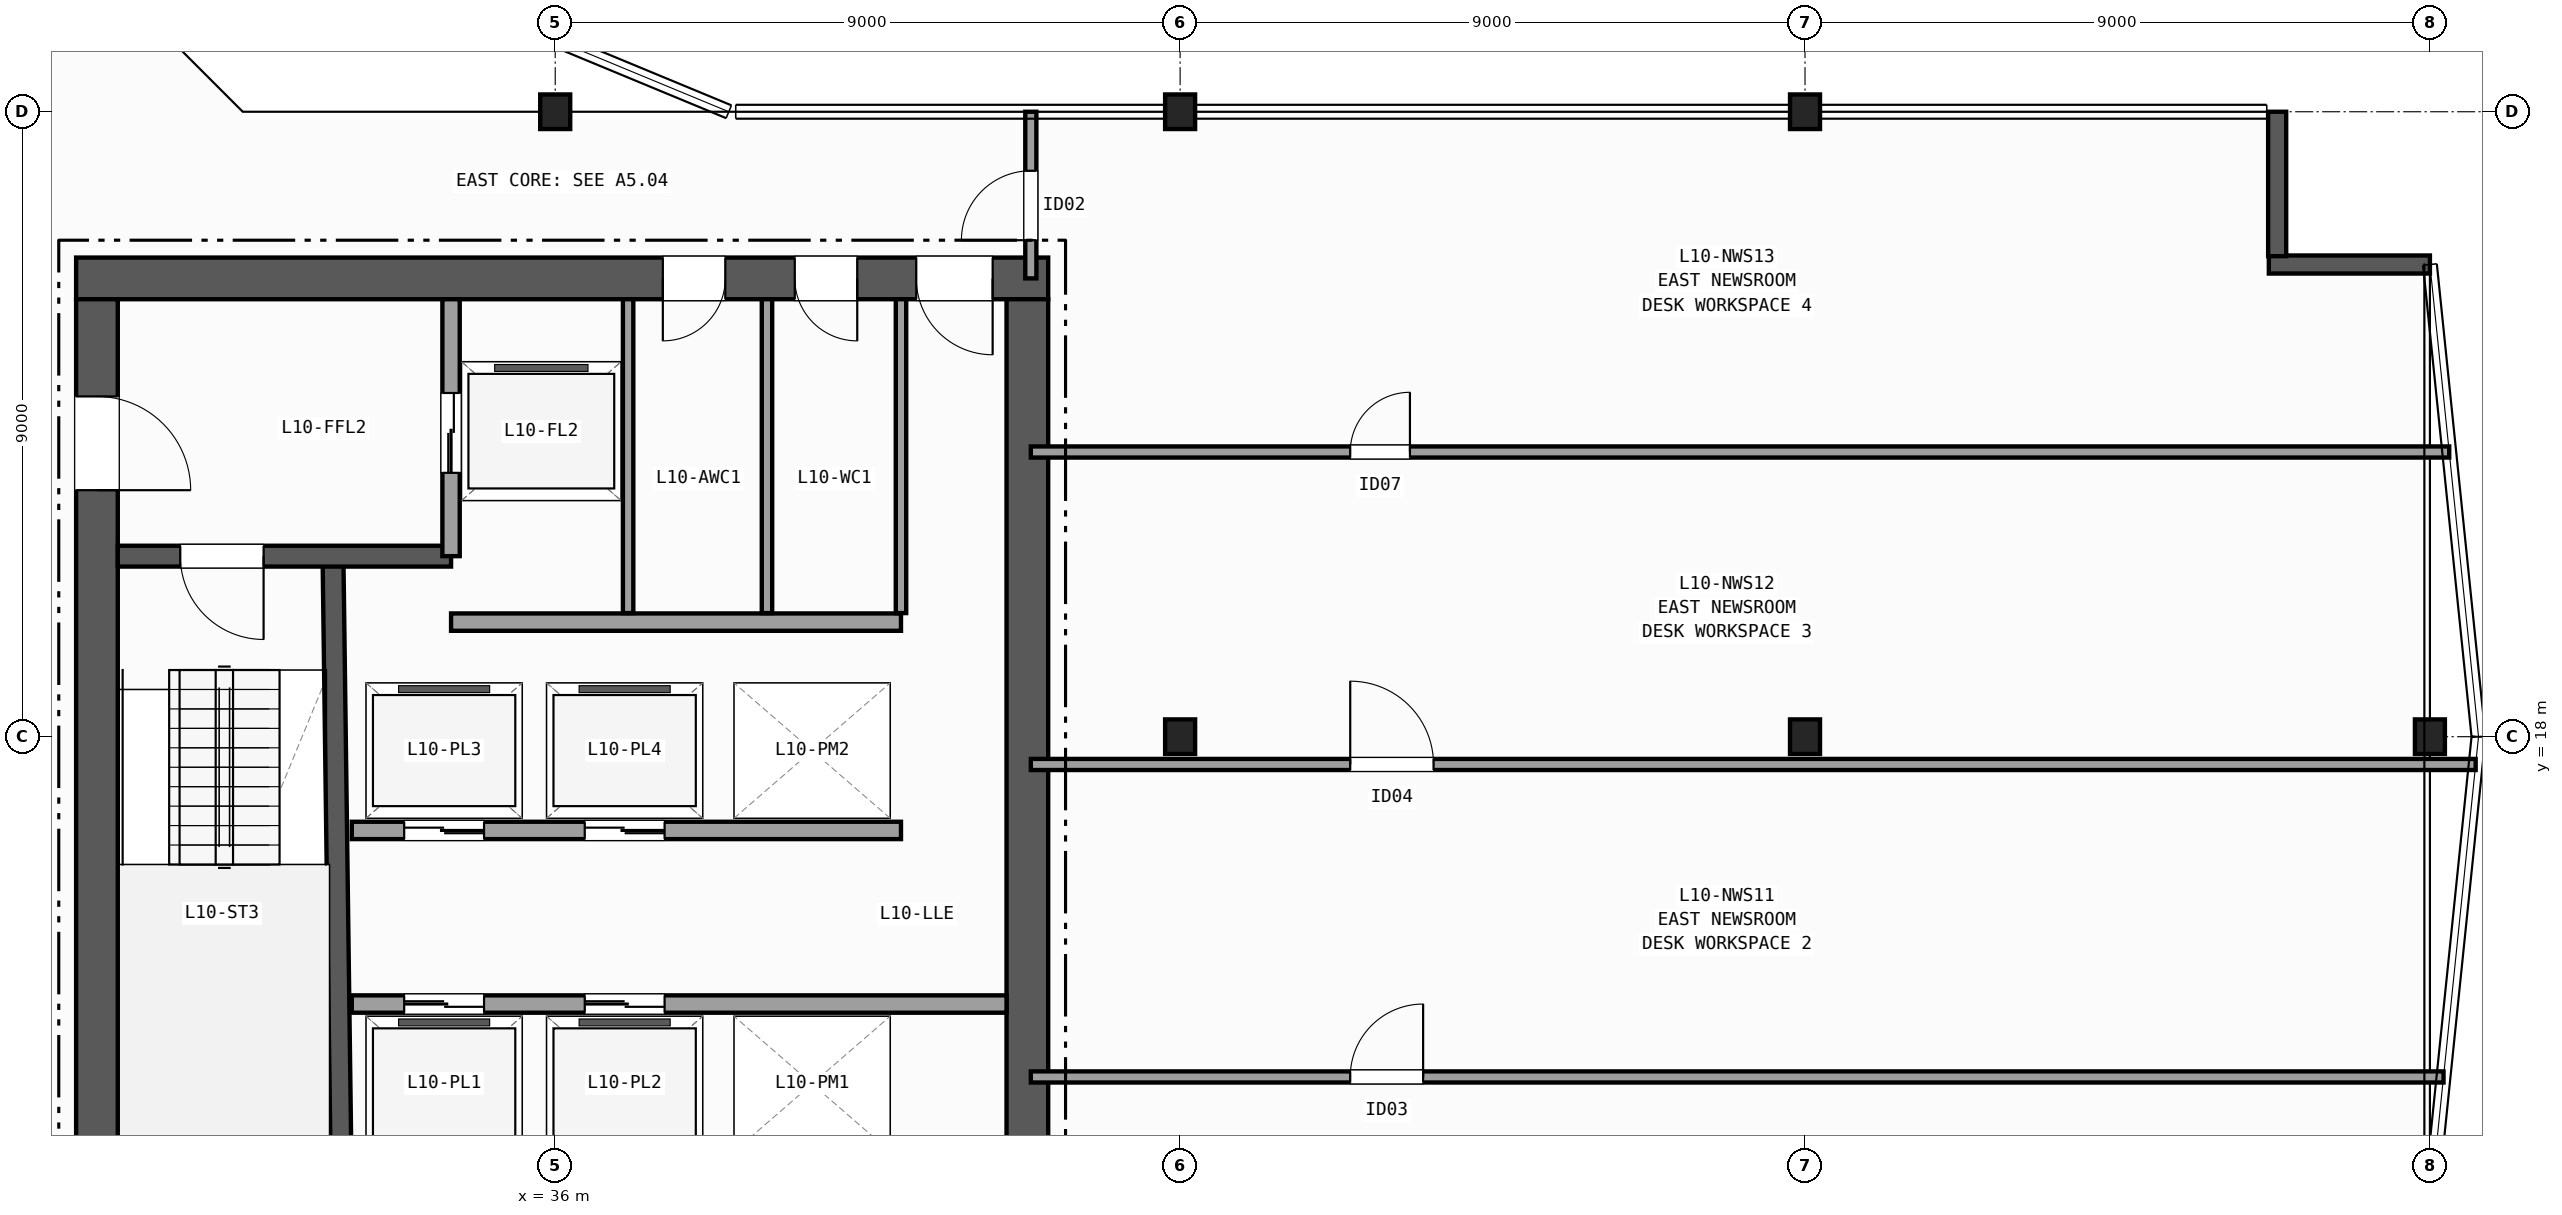
"""IFC4 building model, lengths in metres.
Left out: names, types, materials, properties, quantities, classifications, styles, units other than length and angle.
Written with IfcOpenShell. Run it as: python <this file> out.ifc"""

import sys

from ifc_helpers import new_model, si_unit, direction, frame, frame_2d, origin, origin_2d, place, context, subcontext, project, spatial, rectangle, i_section, extrude, element, fill, save


model = new_model("IFC4")
c1 = context("Model", 3, precision=1e-05, world=origin(), true_north=direction((0.0, 1.0)))
c2 = subcontext(c1, "Body", "Model", "MODEL_VIEW")
j1 = project(units=[si_unit("LENGTHUNIT", "METRE"), si_unit("PLANEANGLEUNIT", "RADIAN")], contexts=[c1])
p1 = place(None, origin())
s1 = spatial("IfcSite", under=j1, at=p1, CompositionType="ELEMENT")
p2 = place(p1, origin())
s2 = spatial("IfcBuilding", under=s1, at=p2, CompositionType="ELEMENT")
p3 = place(p2, frame((0.0, 0.0, 47.1)))
s3 = spatial("IfcBuildingStorey", under=s2, at=p3, CompositionType="ELEMENT", Elevation=47.1)
for number, where, z_axis, x_axis in (
    (1, (36.0, 27.0, 0.0), (0.0, 0.0, 1.0), (1.0, 0.0, 0.0)),
    (2, (45.0, 18.0, 0.0), (0.0, 0.0, 1.0), (1.0, 0.0, 0.0)),
    (3, (45.0, 27.0, 0.0), (0.0, 0.0, 1.0), (1.0, 0.0, 0.0)),
    (4, (54.0, 18.0, 0.0), (0.0, 0.0, 1.0), (1.0, 0.0, 0.0)),
    (5, (54.0, 27.0, 0.0), (0.0, 0.0, 1.0), (1.0, 0.0, 0.0)),
    (6, (63.0, 18.0, 0.0), (0.0, 0.0, 1.0), (1.0, 0.0, 0.0)),
):
    element("IfcColumn", number, at=place(p3, frame(where, z_axis=z_axis, x_axis=x_axis)), inside=s3, PredefinedType="COLUMN", context=c2, shape_type="SweptSolid", body=[
        extrude(i_section(OverallWidth=0.432, OverallDepth=0.498, WebThickness=0.056, FlangeThickness=0.089, FilletRadius=0.015, at=origin_2d()), origin(), (0.0, 0.0, 1.0), 3.7),
    ])
p4 = place(p3, frame((63.0, 24.8, 0.0), z_axis=(0.0, 0.0, 1.0), x_axis=(-1.0, 0.0, 0.0)))
e7 = element("IfcWall", 7, at=p4, inside=s3, PredefinedType="SOLIDWALL", context=c2, shape_type="SweptSolid", body=[
    extrude(rectangle(XDim=2.32, YDim=0.26, at=frame_2d((1.16, 0.0))), origin(), (0.0, 0.0, 1.0), 3.42),
])
p5 = place(p3, frame((60.8, 24.92, 0.0), z_axis=(0.0, 0.0, 1.0), x_axis=(0.0, 1.0, 0.0)))
e8 = element("IfcWall", 8, at=p5, inside=s3, PredefinedType="SOLIDWALL", context=c2, shape_type="SweptSolid", body=[
    extrude(rectangle(XDim=2.08, YDim=0.26, at=frame_2d((1.04, 0.0))), origin(), (0.0, 0.0, 1.0), 3.42),
])
p6 = place(p3, frame((43.1, 24.6, 0.0), z_axis=(0.0, 0.0, 1.0), x_axis=(-1.0, 0.0, 0.0)))
e9 = element("IfcWall", 9, at=p6, inside=s3, PredefinedType="SHEAR", context=c2, shape_type="SweptSolid", body=[
    extrude(rectangle(XDim=14.0, YDim=0.6, at=frame_2d((7.0, 0.0))), origin(), (0.0, 0.0, 1.0), 3.42),
])
p7 = place(p6, frame((0.8, 0.0, 0.0)))
e10 = element("IfcOpeningElement", 10, at=p7, cuts=e9, PredefinedType="OPENING", context=c2, shape_type="SweptSolid", body=[
    extrude(rectangle(XDim=1.1, YDim=2.15, at=frame_2d((0.55, 1.075))), frame((0.0, 0.31, 0.0), z_axis=(0.0, -1.0, 0.0), x_axis=(1.0, 0.0, 0.0)), (0.0, 0.0, 1.0), 0.62),
])
p8 = place(p6, frame((2.75, 0.0, 0.0)))
e11 = element("IfcOpeningElement", 11, at=p8, cuts=e9, PredefinedType="OPENING", context=c2, shape_type="SweptSolid", body=[
    extrude(rectangle(XDim=0.9, YDim=2.1, at=frame_2d((0.45, 1.05))), frame((0.0, 0.31, 0.0), z_axis=(0.0, -1.0, 0.0), x_axis=(1.0, 0.0, 0.0)), (0.0, 0.0, 1.0), 0.62),
])
p9 = place(p6, frame((4.65, 0.0, 0.0)))
e12 = element("IfcOpeningElement", 12, at=p9, cuts=e9, PredefinedType="OPENING", context=c2, shape_type="SweptSolid", body=[
    extrude(rectangle(XDim=0.9, YDim=2.1, at=frame_2d((0.45, 1.05))), frame((0.0, 0.31, 0.0), z_axis=(0.0, -1.0, 0.0), x_axis=(1.0, 0.0, 0.0)), (0.0, 0.0, 1.0), 0.62),
])
p10 = place(p3, frame((29.4, 24.3, 0.0), z_axis=(0.0, 0.0, 1.0), x_axis=(0.0, -1.0, 0.0)))
e13 = element("IfcWall", 13, at=p10, inside=s3, PredefinedType="SHEAR", context=c2, shape_type="SweptSolid", body=[
    extrude(rectangle(XDim=12.8, YDim=0.6, at=frame_2d((6.4, 0.0))), origin(), (0.0, 0.0, 1.0), 3.42),
])
p11 = place(p10, frame((1.4, 0.0, 0.0)))
e14 = element("IfcOpeningElement", 14, at=p11, cuts=e13, PredefinedType="OPENING", context=c2, shape_type="SweptSolid", body=[
    extrude(rectangle(XDim=1.35, YDim=2.15, at=frame_2d((0.675, 1.075))), frame((0.0, 0.31, 0.0), z_axis=(0.0, -1.0, 0.0), x_axis=(1.0, 0.0, 0.0)), (0.0, 0.0, 1.0), 0.62),
])
p12 = place(p3, frame((42.8, 11.5, 0.0), z_axis=(0.0, 0.0, 1.0), x_axis=(0.0, 1.0, 0.0)))
e15 = element("IfcWall", 15, at=p12, inside=s3, PredefinedType="SHEAR", context=c2, shape_type="SweptSolid", body=[
    extrude(rectangle(XDim=12.8, YDim=0.6, at=frame_2d((6.4, 0.0))), origin(), (0.0, 0.0, 1.0), 3.42),
])
p13 = place(p3, frame((32.92, 11.5, 0.0), z_axis=(0.0, 0.0, 1.0), x_axis=(-0.013244407292, 0.999912288991, 0.0)))
e16 = element("IfcWall", 16, at=p13, inside=s3, PredefinedType="SHEAR", context=c2, shape_type="SweptSolid", body=[
    extrude(rectangle(XDim=9.051, YDim=0.3, at=frame_2d((4.525, 0.0))), origin(), (0.0, 0.0, 1.0), 3.42),
])
p14 = place(p3, frame((34.5, 20.6, 0.0), z_axis=(0.0, 0.0, 1.0), x_axis=(-1.0, 0.0, 0.0)))
e17 = element("IfcWall", 17, at=p14, inside=s3, PredefinedType="SHEAR", context=c2, shape_type="SweptSolid", body=[
    extrude(rectangle(XDim=4.8, YDim=0.3, at=frame_2d((2.4, 0.0))), origin(), (0.0, 0.0, 1.0), 3.42),
])
p15 = place(p14, frame((2.7, 0.0, 0.0)))
e18 = element("IfcOpeningElement", 18, at=p15, cuts=e17, PredefinedType="OPENING", context=c2, shape_type="SweptSolid", body=[
    extrude(rectangle(XDim=1.2, YDim=2.15, at=frame_2d((0.6, 1.075))), frame((0.0, 0.16, 0.0), z_axis=(0.0, -1.0, 0.0), x_axis=(1.0, 0.0, 0.0)), (0.0, 0.0, 1.0), 0.32),
])
p16 = place(p3, frame((34.5, 20.6, 0.0), z_axis=(0.0, 0.0, 1.0), x_axis=(0.0, 1.0, 0.0)))
e19 = element("IfcWall", 19, at=p16, inside=s3, PredefinedType="PARTITIONING", context=c2, shape_type="SweptSolid", body=[
    extrude(rectangle(XDim=3.7, YDim=0.25, at=frame_2d((1.85, 0.0))), origin(), (0.0, 0.0, 1.0), 3.42),
])
p17 = place(p16, frame((1.2, 0.0, 0.0)))
e20 = element("IfcOpeningElement", 20, at=p17, cuts=e19, PredefinedType="OPENING", context=c2, shape_type="SweptSolid", body=[
    extrude(rectangle(XDim=1.15, YDim=2.15, at=frame_2d((0.575, 1.075))), frame((0.0, 0.135, 0.0), z_axis=(0.0, -1.0, 0.0), x_axis=(1.0, 0.0, 0.0)), (0.0, 0.0, 1.0), 0.27),
])
p18 = place(p3, frame((34.5, 19.65, 0.0), z_axis=(0.0, 0.0, 1.0), x_axis=(1.0, 0.0, 0.0)))
e21 = element("IfcWall", 21, at=p18, inside=s3, PredefinedType="PARTITIONING", context=c2, shape_type="SweptSolid", body=[
    extrude(rectangle(XDim=6.48, YDim=0.25, at=frame_2d((3.24, 0.0))), origin(), (0.0, 0.0, 1.0), 3.42),
])
p19 = place(p3, frame((33.07, 14.15, 0.0), z_axis=(0.0, 0.0, 1.0), x_axis=(1.0, 0.0, 0.0)))
e22 = element("IfcWall", 22, at=p19, inside=s3, PredefinedType="PARTITIONING", context=c2, shape_type="SweptSolid", body=[
    extrude(rectangle(XDim=9.43, YDim=0.25, at=frame_2d((4.715, 0.0))), origin(), (0.0, 0.0, 1.0), 3.42),
])
p20 = place(p19, frame((0.755, 0.0, 0.0)))
e23 = element("IfcOpeningElement", 23, at=p20, cuts=e22, PredefinedType="OPENING", context=c2, shape_type="SweptSolid", body=[
    extrude(rectangle(XDim=1.15, YDim=2.15, at=frame_2d((0.575, 1.075))), frame((0.0, 0.135, 0.0), z_axis=(0.0, -1.0, 0.0), x_axis=(1.0, 0.0, 0.0)), (0.0, 0.0, 1.0), 0.27),
])
p21 = place(p19, frame((3.355, 0.0, 0.0)))
e24 = element("IfcOpeningElement", 24, at=p21, cuts=e22, PredefinedType="OPENING", context=c2, shape_type="SweptSolid", body=[
    extrude(rectangle(XDim=1.15, YDim=2.15, at=frame_2d((0.575, 1.075))), frame((0.0, 0.135, 0.0), z_axis=(0.0, -1.0, 0.0), x_axis=(1.0, 0.0, 0.0)), (0.0, 0.0, 1.0), 0.27),
])
p22 = place(p3, frame((40.98, 16.65, 0.0), z_axis=(0.0, 0.0, 1.0), x_axis=(-1.0, 0.0, 0.0)))
e25 = element("IfcWall", 25, at=p22, inside=s3, PredefinedType="PARTITIONING", context=c2, shape_type="SweptSolid", body=[
    extrude(rectangle(XDim=7.91, YDim=0.25, at=frame_2d((3.955, 0.0))), origin(), (0.0, 0.0, 1.0), 3.42),
])
p23 = place(p22, frame((6.005, 0.0, 0.0)))
e26 = element("IfcOpeningElement", 26, at=p23, cuts=e25, PredefinedType="OPENING", context=c2, shape_type="SweptSolid", body=[
    extrude(rectangle(XDim=1.15, YDim=2.15, at=frame_2d((0.575, 1.075))), frame((0.0, 0.135, 0.0), z_axis=(0.0, -1.0, 0.0), x_axis=(1.0, 0.0, 0.0)), (0.0, 0.0, 1.0), 0.27),
])
p24 = place(p22, frame((3.405, 0.0, 0.0)))
e27 = element("IfcOpeningElement", 27, at=p24, cuts=e25, PredefinedType="OPENING", context=c2, shape_type="SweptSolid", body=[
    extrude(rectangle(XDim=1.15, YDim=2.15, at=frame_2d((0.575, 1.075))), frame((0.0, 0.135, 0.0), z_axis=(0.0, -1.0, 0.0), x_axis=(1.0, 0.0, 0.0)), (0.0, 0.0, 1.0), 0.27),
])
for number, where, z_axis, x_axis in (
    (28, (37.05, 19.78, 0.0), (0.0, 0.0, 1.0), (0.0, 1.0, 0.0)),
    (29, (39.05, 19.78, 0.0), (0.0, 0.0, 1.0), (0.0, 1.0, 0.0)),
    (30, (40.98, 19.78, 0.0), (0.0, 0.0, 1.0), (0.0, 1.0, 0.0)),
):
    element("IfcWall", number, at=place(p3, frame(where, z_axis=z_axis, x_axis=x_axis)), inside=s3, PredefinedType="PARTITIONING", context=c2, shape_type="SweptSolid", body=[
        extrude(rectangle(XDim=4.52, YDim=0.15, at=frame_2d((2.26, 0.0))), origin(), (0.0, 0.0, 1.0), 3.42),
    ])
p25 = place(p3, frame((42.85, 24.6, 0.0), z_axis=(0.0, 0.0, 1.0), x_axis=(0.0, 1.0, 0.0)))
e31 = element("IfcWall", 31, at=p25, inside=s3, PredefinedType="PARTITIONING", context=c2, shape_type="SweptSolid", body=[
    extrude(rectangle(XDim=2.4, YDim=0.16, at=frame_2d((1.2, 0.0))), origin(), (0.0, 0.0, 1.0), 2.627),
])
p26 = place(p25, frame((0.55, 0.0, 0.0)))
e32 = element("IfcOpeningElement", 32, at=p26, cuts=e31, PredefinedType="OPENING", context=c2, shape_type="SweptSolid", body=[
    extrude(rectangle(XDim=1.0, YDim=2.1, at=frame_2d((0.5, 1.05))), frame((0.0, 0.09, 0.0), z_axis=(0.0, -1.0, 0.0), x_axis=(1.0, 0.0, 0.0)), (0.0, 0.0, 1.0), 0.18),
])
p27 = place(p3, frame((42.85, 13.1, 0.0), z_axis=(0.0, 0.0, 1.0), x_axis=(1.0, 0.0, 0.0)))
e33 = element("IfcWall", 33, at=p27, inside=s3, PredefinedType="PARTITIONING", context=c2, shape_type="SweptSolid", body=[
    extrude(rectangle(XDim=20.346, YDim=0.16, at=frame_2d((10.173, 0.0))), origin(), (0.0, 0.0, 1.0), 3.42),
])
p28 = place(p27, frame((4.6, 0.0, 0.0)))
e34 = element("IfcOpeningElement", 34, at=p28, cuts=e33, PredefinedType="OPENING", context=c2, shape_type="SweptSolid", body=[
    extrude(rectangle(XDim=1.05, YDim=2.15, at=frame_2d((0.525, 1.075))), frame((0.0, 0.09, 0.0), z_axis=(0.0, -1.0, 0.0), x_axis=(1.0, 0.0, 0.0)), (0.0, 0.0, 1.0), 0.18),
])
p29 = place(p3, frame((42.85, 17.6, 0.0), z_axis=(0.0, 0.0, 1.0), x_axis=(1.0, 0.0, 0.0)))
e35 = element("IfcWall", 35, at=p29, inside=s3, PredefinedType="PARTITIONING", context=c2, shape_type="SweptSolid", body=[
    extrude(rectangle(XDim=20.809, YDim=0.16, at=frame_2d((10.404, 0.0))), origin(), (0.0, 0.0, 1.0), 3.42),
])
p30 = place(p29, frame((4.6, 0.0, 0.0)))
e36 = element("IfcOpeningElement", 36, at=p30, cuts=e35, PredefinedType="OPENING", context=c2, shape_type="SweptSolid", body=[
    extrude(rectangle(XDim=1.2, YDim=2.15, at=frame_2d((0.6, 1.075))), frame((0.0, 0.09, 0.0), z_axis=(0.0, -1.0, 0.0), x_axis=(1.0, 0.0, 0.0)), (0.0, 0.0, 1.0), 0.18),
])
p31 = place(p3, frame((42.85, 22.1, 0.0), z_axis=(0.0, 0.0, 1.0), x_axis=(1.0, 0.0, 0.0)))
e37 = element("IfcWall", 37, at=p31, inside=s3, PredefinedType="PARTITIONING", context=c2, shape_type="SweptSolid", body=[
    extrude(rectangle(XDim=20.428, YDim=0.16, at=frame_2d((10.214, 0.0))), origin(), (0.0, 0.0, 1.0), 3.42),
])
p32 = place(p31, frame((4.6, 0.0, 0.0)))
e38 = element("IfcOpeningElement", 38, at=p32, cuts=e37, PredefinedType="OPENING", context=c2, shape_type="SweptSolid", body=[
    extrude(rectangle(XDim=0.86, YDim=2.05, at=frame_2d((0.43, 1.025))), frame((0.0, 0.09, 0.0), z_axis=(0.0, -1.0, 0.0), x_axis=(1.0, 0.0, 0.0)), (0.0, 0.0, 1.0), 0.18),
])
p33 = place(p15, origin())
e39 = element("IfcDoor", 39, at=p33, inside=s3, OperationType="SINGLE_SWING_LEFT", PredefinedType="DOOR", context=c2, shape_type="SweptSolid", body=[
    extrude(rectangle(XDim=1.2, YDim=2.15, at=frame_2d((0.6, 1.075))), frame((0.0, 0.025, 0.0), z_axis=(0.0, -1.0, 0.0), x_axis=(1.0, 0.0, 0.0)), (0.0, 0.0, 1.0), 0.05),
])
fill(e18, e39)
p34 = place(p11, origin())
e40 = element("IfcDoor", 40, at=p34, inside=s3, OperationType="SINGLE_SWING_RIGHT", PredefinedType="DOOR", context=c2, shape_type="SweptSolid", body=[
    extrude(rectangle(XDim=1.35, YDim=2.15, at=frame_2d((0.675, 1.075))), frame((0.0, 0.025, 0.0), z_axis=(0.0, -1.0, 0.0), x_axis=(1.0, 0.0, 0.0)), (0.0, 0.0, 1.0), 0.05),
])
fill(e14, e40)
p35 = place(p7, origin())
e41 = element("IfcDoor", 41, at=p35, inside=s3, OperationType="SINGLE_SWING_LEFT", PredefinedType="DOOR", context=c2, shape_type="SweptSolid", body=[
    extrude(rectangle(XDim=1.1, YDim=2.15, at=frame_2d((0.55, 1.075))), frame((0.0, 0.025, 0.0), z_axis=(0.0, -1.0, 0.0), x_axis=(1.0, 0.0, 0.0)), (0.0, 0.0, 1.0), 0.05),
])
fill(e10, e41)
p36 = place(p8, origin())
e42 = element("IfcDoor", 42, at=p36, inside=s3, OperationType="SINGLE_SWING_LEFT", PredefinedType="DOOR", context=c2, shape_type="SweptSolid", body=[
    extrude(rectangle(XDim=0.9, YDim=2.1, at=frame_2d((0.45, 1.05))), frame((0.0, 0.025, 0.0), z_axis=(0.0, -1.0, 0.0), x_axis=(1.0, 0.0, 0.0)), (0.0, 0.0, 1.0), 0.05),
])
fill(e11, e42)
p37 = place(p9, origin())
e43 = element("IfcDoor", 43, at=p37, inside=s3, OperationType="SINGLE_SWING_RIGHT", PredefinedType="DOOR", context=c2, shape_type="SweptSolid", body=[
    extrude(rectangle(XDim=0.9, YDim=2.1, at=frame_2d((0.45, 1.05))), frame((0.0, 0.025, 0.0), z_axis=(0.0, -1.0, 0.0), x_axis=(1.0, 0.0, 0.0)), (0.0, 0.0, 1.0), 0.05),
])
fill(e12, e43)
p38 = place(p17, origin())
e44 = element("IfcDoor", 44, at=p38, inside=s3, OperationType="DOUBLE_DOOR_SLIDING", PredefinedType="DOOR", context=c2, shape_type="SweptSolid", body=[
    extrude(rectangle(XDim=1.15, YDim=2.15, at=frame_2d((0.575, 1.075))), frame((0.0, 0.025, 0.0), z_axis=(0.0, -1.0, 0.0), x_axis=(1.0, 0.0, 0.0)), (0.0, 0.0, 1.0), 0.05),
])
fill(e20, e44)
p39 = place(p20, origin())
e45 = element("IfcDoor", 45, at=p39, inside=s3, OperationType="DOUBLE_DOOR_SLIDING", PredefinedType="DOOR", context=c2, shape_type="SweptSolid", body=[
    extrude(rectangle(XDim=1.15, YDim=2.15, at=frame_2d((0.575, 1.075))), frame((0.0, 0.025, 0.0), z_axis=(0.0, -1.0, 0.0), x_axis=(1.0, 0.0, 0.0)), (0.0, 0.0, 1.0), 0.05),
])
fill(e23, e45)
p40 = place(p21, origin())
e46 = element("IfcDoor", 46, at=p40, inside=s3, OperationType="DOUBLE_DOOR_SLIDING", PredefinedType="DOOR", context=c2, shape_type="SweptSolid", body=[
    extrude(rectangle(XDim=1.15, YDim=2.15, at=frame_2d((0.575, 1.075))), frame((0.0, 0.025, 0.0), z_axis=(0.0, -1.0, 0.0), x_axis=(1.0, 0.0, 0.0)), (0.0, 0.0, 1.0), 0.05),
])
fill(e24, e46)
p41 = place(p23, origin())
e47 = element("IfcDoor", 47, at=p41, inside=s3, OperationType="DOUBLE_DOOR_SLIDING", PredefinedType="DOOR", context=c2, shape_type="SweptSolid", body=[
    extrude(rectangle(XDim=1.15, YDim=2.15, at=frame_2d((0.575, 1.075))), frame((0.0, 0.025, 0.0), z_axis=(0.0, -1.0, 0.0), x_axis=(1.0, 0.0, 0.0)), (0.0, 0.0, 1.0), 0.05),
])
fill(e26, e47)
p42 = place(p24, origin())
e48 = element("IfcDoor", 48, at=p42, inside=s3, OperationType="DOUBLE_DOOR_SLIDING", PredefinedType="DOOR", context=c2, shape_type="SweptSolid", body=[
    extrude(rectangle(XDim=1.15, YDim=2.15, at=frame_2d((0.575, 1.075))), frame((0.0, 0.025, 0.0), z_axis=(0.0, -1.0, 0.0), x_axis=(1.0, 0.0, 0.0)), (0.0, 0.0, 1.0), 0.05),
])
fill(e27, e48)
p43 = place(p26, origin())
e49 = element("IfcDoor", 49, at=p43, inside=s3, OperationType="SINGLE_SWING_LEFT", PredefinedType="DOOR", context=c2, shape_type="SweptSolid", body=[
    extrude(rectangle(XDim=1.0, YDim=2.1, at=frame_2d((0.5, 1.05))), frame((0.0, 0.025, 0.0), z_axis=(0.0, -1.0, 0.0), x_axis=(1.0, 0.0, 0.0)), (0.0, 0.0, 1.0), 0.05),
])
fill(e32, e49)
p44 = place(p28, origin())
e50 = element("IfcDoor", 50, at=p44, inside=s3, OperationType="SINGLE_SWING_RIGHT", PredefinedType="DOOR", context=c2, shape_type="SweptSolid", body=[
    extrude(rectangle(XDim=1.05, YDim=2.15, at=frame_2d((0.525, 1.075))), frame((0.0, 0.025, 0.0), z_axis=(0.0, -1.0, 0.0), x_axis=(1.0, 0.0, 0.0)), (0.0, 0.0, 1.0), 0.05),
])
fill(e34, e50)
p45 = place(p30, origin())
e51 = element("IfcDoor", 51, at=p45, inside=s3, OperationType="SINGLE_SWING_LEFT", PredefinedType="DOOR", context=c2, shape_type="SweptSolid", body=[
    extrude(rectangle(XDim=1.2, YDim=2.15, at=frame_2d((0.6, 1.075))), frame((0.0, 0.025, 0.0), z_axis=(0.0, -1.0, 0.0), x_axis=(1.0, 0.0, 0.0)), (0.0, 0.0, 1.0), 0.05),
])
fill(e36, e51)
p46 = place(p32, origin())
e52 = element("IfcDoor", 52, at=p46, inside=s3, OperationType="SINGLE_SWING_RIGHT", PredefinedType="DOOR", context=c2, shape_type="SweptSolid", body=[
    extrude(rectangle(XDim=0.86, YDim=2.05, at=frame_2d((0.43, 1.025))), frame((0.0, 0.025, 0.0), z_axis=(0.0, -1.0, 0.0), x_axis=(1.0, 0.0, 0.0)), (0.0, 0.0, 1.0), 0.05),
])
fill(e38, e52)
save(model, sys.argv[1])
